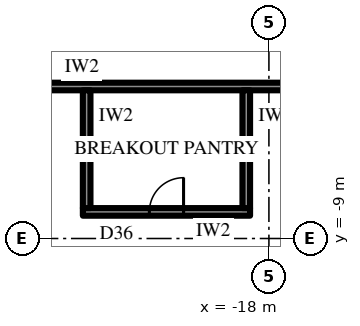
"""IFC4 building model, lengths in metres.
Left out: names, types, materials, properties, quantities, classifications, styles, units other than length and angle.
Written with IfcOpenShell. Run it as: python <this file> out.ifc"""

import sys

from ifc_helpers import new_model, si_unit, direction, frame, frame_2d, origin, place, context, subcontext, project, spatial, rectangle, extrude, element, fill, save


model = new_model("IFC4")
c1 = context("Model", 3, precision=1e-05, world=origin(), true_north=direction((0.0, 1.0)))
c2 = subcontext(c1, "Body", "Model", "MODEL_VIEW")
j1 = project(units=[si_unit("LENGTHUNIT", "METRE"), si_unit("PLANEANGLEUNIT", "RADIAN")], contexts=[c1])
p1 = place(None, origin())
s1 = spatial("IfcSite", under=j1, at=p1, CompositionType="ELEMENT")
p2 = place(p1, origin())
s2 = spatial("IfcBuilding", under=s1, at=p2, CompositionType="ELEMENT")
p3 = place(p2, frame((0.0, 0.0, 282.7)))
s3 = spatial("IfcBuildingStorey", under=s2, at=p3, CompositionType="ELEMENT", Elevation=282.7)
p4 = place(p3, frame((-31.263, -3.551, 0.0), z_axis=(0.0, 0.0, 1.0), x_axis=(0.500000442367, -0.866025148383, 0.0)))
e1 = element("IfcWall", 1, at=p4, inside=s3, PredefinedType="SOLIDWALL", context=c2, shape_type="SweptSolid", body=[
    extrude(rectangle(XDim=25.113, YDim=0.3, at=frame_2d((12.556, 0.0))), origin(), (0.0, 0.0, 1.0), 2.8),
])
p5 = place(p4, frame((4.278, 0.0, 0.6)))
e2 = element("IfcOpeningElement", 2, at=p5, cuts=e1, PredefinedType="OPENING", context=c2, shape_type="SweptSolid", body=[
    extrude(rectangle(XDim=2.7, YDim=1.95, at=frame_2d((1.35, 0.975))), frame((0.0, 0.16, 0.0), z_axis=(0.0, -1.0, 0.0), x_axis=(1.0, 0.0, 0.0)), (0.0, 0.0, 1.0), 0.32),
])
p6 = place(p4, frame((9.647, 0.0, 0.0)))
e3 = element("IfcOpeningElement", 3, at=p6, cuts=e1, PredefinedType="OPENING", context=c2, shape_type="SweptSolid", body=[
    extrude(rectangle(XDim=1.2, YDim=2.4, at=frame_2d((0.6, 1.2))), frame((0.0, 0.16, 0.0), z_axis=(0.0, -1.0, 0.0), x_axis=(1.0, 0.0, 0.0)), (0.0, 0.0, 1.0), 0.32),
])
p7 = place(p4, frame((13.516, 0.0, 0.6)))
e4 = element("IfcOpeningElement", 4, at=p7, cuts=e1, PredefinedType="OPENING", context=c2, shape_type="SweptSolid", body=[
    extrude(rectangle(XDim=2.7, YDim=1.95, at=frame_2d((1.35, 0.975))), frame((0.0, 0.16, 0.0), z_axis=(0.0, -1.0, 0.0), x_axis=(1.0, 0.0, 0.0)), (0.0, 0.0, 1.0), 0.32),
])
p8 = place(p4, frame((18.135, 0.0, 0.6)))
e5 = element("IfcOpeningElement", 5, at=p8, cuts=e1, PredefinedType="OPENING", context=c2, shape_type="SweptSolid", body=[
    extrude(rectangle(XDim=2.7, YDim=1.95, at=frame_2d((1.35, 0.975))), frame((0.0, 0.16, 0.0), z_axis=(0.0, -1.0, 0.0), x_axis=(1.0, 0.0, 0.0)), (0.0, 0.0, 1.0), 0.32),
])
p9 = place(p3, frame((-15.5, -5.0, 0.0), z_axis=(0.0, 0.0, 1.0), x_axis=(-1.0, 0.0, 0.0)))
e6 = element("IfcWall", 6, at=p9, inside=s3, PredefinedType="PARTITIONING", context=c2, shape_type="SweptSolid", body=[
    extrude(rectangle(XDim=14.845, YDim=0.2, at=frame_2d((7.423, 0.0))), origin(), (0.0, 0.0, 1.0), 4.0),
])
p10 = place(p9, frame((0.985, 0.0, 0.0)))
e7 = element("IfcOpeningElement", 7, at=p10, cuts=e6, PredefinedType="OPENING", context=c2, shape_type="SweptSolid", body=[
    extrude(rectangle(XDim=1.0, YDim=2.2, at=frame_2d((0.5, 1.1))), frame((0.0, 0.11, 0.0), z_axis=(0.0, -1.0, 0.0), x_axis=(1.0, 0.0, 0.0)), (0.0, 0.0, 1.0), 0.22),
])
p11 = place(p3, frame((-18.496, -8.3, 0.0), z_axis=(0.0, 0.0, 1.0), x_axis=(-1.0, 0.0, 0.0)))
e8 = element("IfcWall", 8, at=p11, inside=s3, PredefinedType="PARTITIONING", context=c2, shape_type="SweptSolid", body=[
    extrude(rectangle(XDim=4.4, YDim=0.2, at=frame_2d((2.2, 0.0))), origin(), (0.0, 0.0, 1.0), 4.0),
])
p12 = place(p11, frame((1.75, 0.0, 0.0)))
e9 = element("IfcOpeningElement", 9, at=p12, cuts=e8, PredefinedType="OPENING", context=c2, shape_type="SweptSolid", body=[
    extrude(rectangle(XDim=0.9, YDim=2.2, at=frame_2d((0.45, 1.1))), frame((0.0, 0.11, 0.0), z_axis=(0.0, -1.0, 0.0), x_axis=(1.0, 0.0, 0.0)), (0.0, 0.0, 1.0), 0.22),
])
for number, where, z_axis, x_axis in (
    (10, (-18.596, -5.1, 0.0), (0.0, 0.0, 1.0), (0.0, -1.0, 0.0)),
    (11, (-22.796, -5.1, 0.0), (0.0, 0.0, 1.0), (0.0, -1.0, 0.0)),
):
    element("IfcWall", number, at=place(p3, frame(where, z_axis=z_axis, x_axis=x_axis)), inside=s3, PredefinedType="PARTITIONING", context=c2, shape_type="SweptSolid", body=[
        extrude(rectangle(XDim=3.1, YDim=0.2, at=frame_2d((1.55, 0.0))), origin(), (0.0, 0.0, 1.0), 4.0),
    ])
p13 = place(p12, frame((0.9, 0.0, 0.0), z_axis=(0.0, 0.0, 1.0), x_axis=(-1.0, 0.0, 0.0)))
e12 = element("IfcDoor", 12, at=p13, inside=s3, OperationType="SINGLE_SWING_LEFT", PredefinedType="DOOR", context=c2, shape_type="SweptSolid", body=[
    extrude(rectangle(XDim=0.9, YDim=2.2, at=frame_2d((0.45, 1.1))), frame((0.0, 0.025, 0.0), z_axis=(0.0, -1.0, 0.0), x_axis=(1.0, 0.0, 0.0)), (0.0, 0.0, 1.0), 0.05),
])
fill(e9, e12)
save(model, sys.argv[1])
